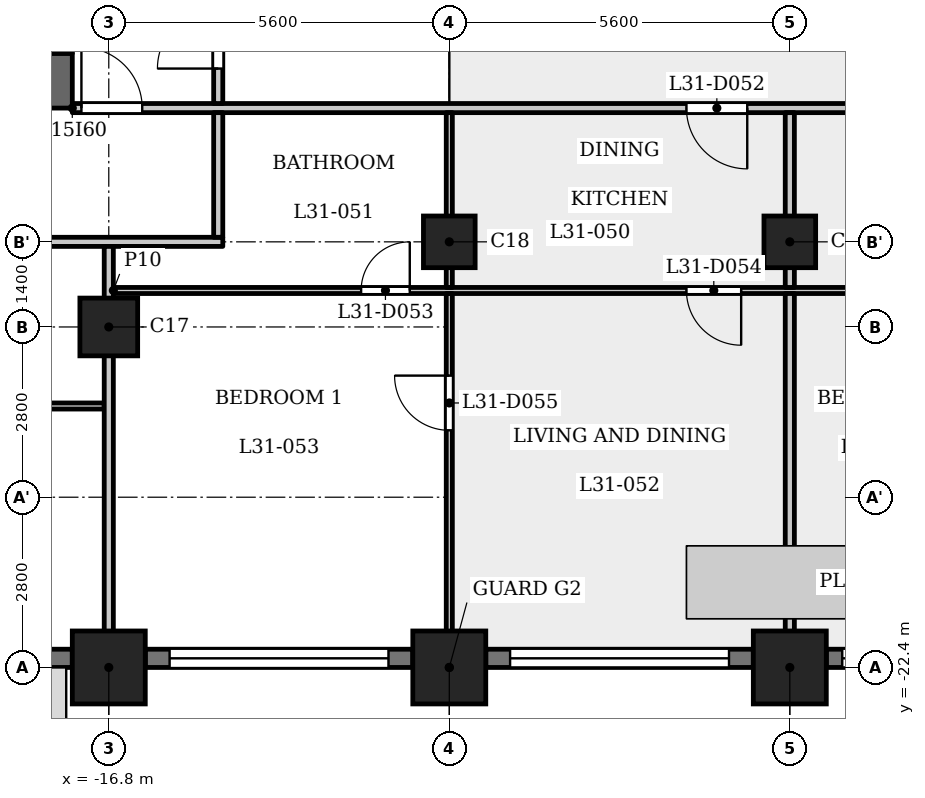
"""IFC4 building model, lengths in metres.
Left out: names, types, materials, properties, quantities, classifications, styles, units other than length and angle.
Written with IfcOpenShell. Run it as: python <this file> out.ifc"""

import sys

from ifc_helpers import new_model, si_unit, direction, frame, frame_2d, origin, origin_2d, place, context, subcontext, project, spatial, rectangle, extrude, element, fill, save


model = new_model("IFC4")
c1 = context("Model", 3, precision=1e-05, world=origin(), true_north=direction((0.0, 1.0)))
c2 = subcontext(c1, "Body", "Model", "MODEL_VIEW")
j1 = project(units=[si_unit("LENGTHUNIT", "METRE"), si_unit("PLANEANGLEUNIT", "RADIAN")], contexts=[c1])
p1 = place(None, origin())
s1 = spatial("IfcSite", under=j1, at=p1, CompositionType="ELEMENT")
p2 = place(p1, origin())
s2 = spatial("IfcBuilding", under=s1, at=p2, CompositionType="ELEMENT")
p3 = place(p2, frame((0.0, 0.0, 121.8)))
s3 = spatial("IfcBuildingStorey", under=s2, at=p3, CompositionType="ELEMENT", Elevation=121.8)
for number, where, z_axis, x_axis in (
    (1, (-16.8, -22.4, 0.0), (0.0, 0.0, 1.0), (1.0, 0.0, 0.0)),
    (2, (-11.2, -22.4, 0.0), (0.0, 0.0, 1.0), (1.0, 0.0, 0.0)),
    (3, (-5.6, -22.4, 0.0), (0.0, 0.0, 1.0), (1.0, 0.0, 0.0)),
):
    element("IfcColumn", number, at=place(p3, frame(where, z_axis=z_axis, x_axis=x_axis)), inside=s3, PredefinedType="COLUMN", context=c2, shape_type="SweptSolid", body=[
        extrude(rectangle(XDim=1.2, YDim=1.2, at=origin_2d()), origin(), (0.0, 0.0, 1.0), 3.5),
    ])
p4 = place(p3, frame((-16.8, -16.8, 0.0), z_axis=(0.0, 0.0, 1.0), x_axis=(1.0, 0.0, 0.0)))
e4 = element("IfcColumn", 4, at=p4, inside=s3, PredefinedType="COLUMN", context=c2, shape_type="SweptSolid", body=[
    extrude(rectangle(XDim=0.95, YDim=0.95, at=origin_2d()), origin(), (0.0, 0.0, 1.0), 3.5),
])
for number, where, z_axis, x_axis in (
    (5, (-11.2, -15.4, 0.0), (0.0, 0.0, 1.0), (1.0, 0.0, 0.0)),
    (6, (-5.6, -15.4, 0.0), (0.0, 0.0, 1.0), (1.0, 0.0, 0.0)),
):
    element("IfcColumn", number, at=place(p3, frame(where, z_axis=z_axis, x_axis=x_axis)), inside=s3, PredefinedType="COLUMN", context=c2, shape_type="SweptSolid", body=[
        extrude(rectangle(XDim=0.85, YDim=0.85, at=origin_2d()), origin(), (0.0, 0.0, 1.0), 3.5),
    ])
p5 = place(p3, frame((-20.0, -22.25, 0.0), z_axis=(0.0, 0.0, 1.0), x_axis=(1.0, 0.0, 0.0)))
e7 = element("IfcWall", 7, at=p5, inside=s3, PredefinedType="SOLIDWALL", context=c2, shape_type="SweptSolid", body=[
    extrude(rectangle(XDim=2.6, YDim=0.3, at=frame_2d((1.3, 0.0))), origin(), (0.0, 0.0, 1.0), 2.35),
])
p6 = place(p5, frame((0.4, 0.0, 0.9)))
e8 = element("IfcOpeningElement", 8, at=p6, cuts=e7, PredefinedType="OPENING", context=c2, shape_type="SweptSolid", body=[
    extrude(rectangle(XDim=1.8, YDim=1.25, at=frame_2d((0.9, 0.625))), frame((0.0, 0.16, 0.0), z_axis=(0.0, -1.0, 0.0), x_axis=(1.0, 0.0, 0.0)), (0.0, 0.0, 1.0), 0.32),
])
p7 = place(p3, frame((-16.2, -22.25, 0.0), z_axis=(0.0, 0.0, 1.0), x_axis=(1.0, 0.0, 0.0)))
e9 = element("IfcWall", 9, at=p7, inside=s3, PredefinedType="SOLIDWALL", context=c2, shape_type="SweptSolid", body=[
    extrude(rectangle(XDim=4.4, YDim=0.3, at=frame_2d((2.2, 0.0))), origin(), (0.0, 0.0, 1.0), 2.35),
])
p8 = place(p7, frame((0.4, 0.0, 1.2)))
e10 = element("IfcOpeningElement", 10, at=p8, cuts=e9, PredefinedType="OPENING", context=c2, shape_type="SweptSolid", body=[
    extrude(rectangle(XDim=3.6, YDim=0.95, at=frame_2d((1.8, 0.475))), frame((0.0, 0.16, 0.0), z_axis=(0.0, -1.0, 0.0), x_axis=(1.0, 0.0, 0.0)), (0.0, 0.0, 1.0), 0.32),
])
p9 = place(p3, frame((-10.6, -22.25, 0.0), z_axis=(0.0, 0.0, 1.0), x_axis=(1.0, 0.0, 0.0)))
e11 = element("IfcWall", 11, at=p9, inside=s3, PredefinedType="SOLIDWALL", context=c2, shape_type="SweptSolid", body=[
    extrude(rectangle(XDim=4.4, YDim=0.3, at=frame_2d((2.2, 0.0))), origin(), (0.0, 0.0, 1.0), 2.35),
])
p10 = place(p9, frame((0.4, 0.0, 1.2)))
e12 = element("IfcOpeningElement", 12, at=p10, cuts=e11, PredefinedType="OPENING", context=c2, shape_type="SweptSolid", body=[
    extrude(rectangle(XDim=3.6, YDim=0.95, at=frame_2d((1.8, 0.475))), frame((0.0, 0.16, 0.0), z_axis=(0.0, -1.0, 0.0), x_axis=(1.0, 0.0, 0.0)), (0.0, 0.0, 1.0), 0.32),
])
p11 = place(p3, frame((-5.0, -22.25, 0.0), z_axis=(0.0, 0.0, 1.0), x_axis=(1.0, 0.0, 0.0)))
e13 = element("IfcWall", 13, at=p11, inside=s3, PredefinedType="SOLIDWALL", context=c2, shape_type="SweptSolid", body=[
    extrude(rectangle(XDim=4.4, YDim=0.3, at=frame_2d((2.2, 0.0))), origin(), (0.0, 0.0, 1.0), 2.35),
])
p12 = place(p11, frame((0.262, 0.0, 0.9)))
e14 = element("IfcOpeningElement", 14, at=p12, cuts=e13, PredefinedType="OPENING", context=c2, shape_type="SweptSolid", body=[
    extrude(rectangle(XDim=1.8, YDim=1.25, at=frame_2d((0.9, 0.625))), frame((0.0, 0.16, 0.0), z_axis=(0.0, -1.0, 0.0), x_axis=(1.0, 0.0, 0.0)), (0.0, 0.0, 1.0), 0.32),
])
p13 = place(p11, frame((2.837, 0.0, 0.6)))
e15 = element("IfcOpeningElement", 15, at=p13, cuts=e13, PredefinedType="OPENING", context=c2, shape_type="SweptSolid", body=[
    extrude(rectangle(XDim=1.2, YDim=1.55, at=frame_2d((0.6, 0.775))), frame((0.0, 0.16, 0.0), z_axis=(0.0, -1.0, 0.0), x_axis=(1.0, 0.0, 0.0)), (0.0, 0.0, 1.0), 0.32),
])
p14 = place(p3, frame((-17.4, -12.75, 0.0), z_axis=(0.0, 0.0, 1.0), x_axis=(-1.0, 0.0, 0.0)))
e16 = element("IfcWall", 16, at=p14, inside=s3, PredefinedType="SHEAR", context=c2, shape_type="SweptSolid", body=[
    extrude(rectangle(XDim=10.4, YDim=0.9, at=frame_2d((5.2, 0.0))), origin(), (0.0, 0.0, 1.0), 3.15),
])
p15 = place(p3, frame((-17.6, -12.3, 0.0), z_axis=(0.0, 0.0, 1.0), x_axis=(0.0, 1.0, 0.0)))
e17 = element("IfcWall", 17, at=p15, inside=s3, PredefinedType="SHEAR", context=c2, shape_type="SweptSolid", body=[
    extrude(rectangle(XDim=24.6, YDim=0.4, at=frame_2d((12.3, 0.0))), origin(), (0.0, 0.0, 1.0), 3.15),
])
p16 = place(p15, frame((6.0, 0.0, 0.0)))
e18 = element("IfcOpeningElement", 18, at=p16, cuts=e17, PredefinedType="OPENING", context=c2, shape_type="SweptSolid", body=[
    extrude(rectangle(XDim=1.1, YDim=2.1, at=frame_2d((0.55, 1.05))), frame((0.0, 0.21, 0.0), z_axis=(0.0, -1.0, 0.0), x_axis=(1.0, 0.0, 0.0)), (0.0, 0.0, 1.0), 0.42),
])
p17 = place(p15, frame((8.4, 0.0, 0.0)))
e19 = element("IfcOpeningElement", 19, at=p17, cuts=e17, PredefinedType="OPENING", context=c2, shape_type="SweptSolid", body=[
    extrude(rectangle(XDim=1.1, YDim=2.1, at=frame_2d((0.55, 1.05))), frame((0.0, 0.21, 0.0), z_axis=(0.0, -1.0, 0.0), x_axis=(1.0, 0.0, 0.0)), (0.0, 0.0, 1.0), 0.42),
])
p18 = place(p15, frame((10.8, 0.0, 0.0)))
e20 = element("IfcOpeningElement", 20, at=p18, cuts=e17, PredefinedType="OPENING", context=c2, shape_type="SweptSolid", body=[
    extrude(rectangle(XDim=1.1, YDim=2.1, at=frame_2d((0.55, 1.05))), frame((0.0, 0.21, 0.0), z_axis=(0.0, -1.0, 0.0), x_axis=(1.0, 0.0, 0.0)), (0.0, 0.0, 1.0), 0.42),
])
p19 = place(p15, frame((22.8, 0.0, 0.0)))
e21 = element("IfcOpeningElement", 21, at=p19, cuts=e17, PredefinedType="OPENING", context=c2, shape_type="SweptSolid", body=[
    extrude(rectangle(XDim=1.1, YDim=2.1, at=frame_2d((0.55, 1.05))), frame((0.0, 0.21, 0.0), z_axis=(0.0, -1.0, 0.0), x_axis=(1.0, 0.0, 0.0)), (0.0, 0.0, 1.0), 0.42),
])
p20 = place(p15, frame((0.7, 0.0, 0.0)))
e22 = element("IfcOpeningElement", 22, at=p20, cuts=e17, PredefinedType="OPENING", context=c2, shape_type="SweptSolid", body=[
    extrude(rectangle(XDim=1.1, YDim=2.1, at=frame_2d((0.55, 1.05))), frame((0.0, 0.21, 0.0), z_axis=(0.0, -1.0, 0.0), x_axis=(1.0, 0.0, 0.0)), (0.0, 0.0, 1.0), 0.42),
])
p21 = place(p15, frame((12.775, 0.0, 0.0)))
e23 = element("IfcOpeningElement", 23, at=p21, cuts=e17, PredefinedType="OPENING", context=c2, shape_type="SweptSolid", body=[
    extrude(rectangle(XDim=1.8, YDim=2.1, at=frame_2d((0.9, 1.05))), frame((0.0, 0.21, 0.0), z_axis=(0.0, -1.0, 0.0), x_axis=(1.0, 0.0, 0.0)), (0.0, 0.0, 1.0), 0.42),
])
p22 = place(p3, frame((-26.19, -18.1, 0.0), z_axis=(0.0, 0.0, 1.0), x_axis=(1.0, 0.0, 0.0)))
e24 = element("IfcWall", 24, at=p22, inside=s3, PredefinedType="PARTITIONING", context=c2, shape_type="SweptSolid", body=[
    extrude(rectangle(XDim=9.315, YDim=0.1, at=frame_2d((4.658, 0.0))), origin(), (0.0, 0.0, 1.0), 3.15),
])
p23 = place(p22, frame((1.09, 0.0, 0.0)))
e25 = element("IfcOpeningElement", 25, at=p23, cuts=e24, PredefinedType="OPENING", context=c2, shape_type="SweptSolid", body=[
    extrude(rectangle(XDim=0.8, YDim=2.1, at=frame_2d((0.4, 1.05))), frame((0.0, 0.06, 0.0), z_axis=(0.0, -1.0, 0.0), x_axis=(1.0, 0.0, 0.0)), (0.0, 0.0, 1.0), 0.12),
])
p24 = place(p22, frame((4.44, 0.0, 0.0)))
e26 = element("IfcOpeningElement", 26, at=p24, cuts=e24, PredefinedType="OPENING", context=c2, shape_type="SweptSolid", body=[
    extrude(rectangle(XDim=0.9, YDim=2.1, at=frame_2d((0.45, 1.05))), frame((0.0, 0.06, 0.0), z_axis=(0.0, -1.0, 0.0), x_axis=(1.0, 0.0, 0.0)), (0.0, 0.0, 1.0), 0.12),
])
p25 = place(p3, frame((-16.725, -16.2, 0.0), z_axis=(0.0, 0.0, 1.0), x_axis=(1.0, 0.0, 0.0)))
e27 = element("IfcWall", 27, at=p25, inside=s3, PredefinedType="PARTITIONING", context=c2, shape_type="SweptSolid", body=[
    extrude(rectangle(XDim=33.45, YDim=0.1, at=frame_2d((16.725, 0.0))), origin(), (0.0, 0.0, 1.0), 3.15),
])
p26 = place(p25, frame((4.075, 0.0, 0.0)))
e28 = element("IfcOpeningElement", 28, at=p26, cuts=e27, PredefinedType="OPENING", context=c2, shape_type="SweptSolid", body=[
    extrude(rectangle(XDim=0.8, YDim=2.1, at=frame_2d((0.4, 1.05))), frame((0.0, 0.06, 0.0), z_axis=(0.0, -1.0, 0.0), x_axis=(1.0, 0.0, 0.0)), (0.0, 0.0, 1.0), 0.12),
])
p27 = place(p25, frame((9.425, 0.0, 0.0)))
e29 = element("IfcOpeningElement", 29, at=p27, cuts=e27, PredefinedType="OPENING", context=c2, shape_type="SweptSolid", body=[
    extrude(rectangle(XDim=0.9, YDim=2.1, at=frame_2d((0.45, 1.05))), frame((0.0, 0.06, 0.0), z_axis=(0.0, -1.0, 0.0), x_axis=(1.0, 0.0, 0.0)), (0.0, 0.0, 1.0), 0.12),
])
p28 = place(p25, frame((19.875, 0.0, 0.0)))
e30 = element("IfcOpeningElement", 30, at=p28, cuts=e27, PredefinedType="OPENING", context=c2, shape_type="SweptSolid", body=[
    extrude(rectangle(XDim=0.8, YDim=2.1, at=frame_2d((0.4, 1.05))), frame((0.0, 0.06, 0.0), z_axis=(0.0, -1.0, 0.0), x_axis=(1.0, 0.0, 0.0)), (0.0, 0.0, 1.0), 0.12),
])
p29 = place(p25, frame((17.375, 0.0, 0.0)))
e31 = element("IfcOpeningElement", 31, at=p29, cuts=e27, PredefinedType="OPENING", context=c2, shape_type="SweptSolid", body=[
    extrude(rectangle(XDim=0.9, YDim=2.1, at=frame_2d((0.45, 1.05))), frame((0.0, 0.06, 0.0), z_axis=(0.0, -1.0, 0.0), x_axis=(1.0, 0.0, 0.0)), (0.0, 0.0, 1.0), 0.12),
])
p30 = place(p25, frame((12.525, 0.0, 0.0)))
e32 = element("IfcOpeningElement", 32, at=p30, cuts=e27, PredefinedType="OPENING", context=c2, shape_type="SweptSolid", body=[
    extrude(rectangle(XDim=0.9, YDim=2.1, at=frame_2d((0.45, 1.05))), frame((0.0, 0.06, 0.0), z_axis=(0.0, -1.0, 0.0), x_axis=(1.0, 0.0, 0.0)), (0.0, 0.0, 1.0), 0.12),
])
p31 = place(p25, frame((14.775, 0.0, 0.0)))
e33 = element("IfcOpeningElement", 33, at=p31, cuts=e27, PredefinedType="OPENING", context=c2, shape_type="SweptSolid", body=[
    extrude(rectangle(XDim=0.9, YDim=2.1, at=frame_2d((0.45, 1.05))), frame((0.0, 0.06, 0.0), z_axis=(0.0, -1.0, 0.0), x_axis=(1.0, 0.0, 0.0)), (0.0, 0.0, 1.0), 0.12),
])
p32 = place(p25, frame((26.475, 0.0, 0.0)))
e34 = element("IfcOpeningElement", 34, at=p32, cuts=e27, PredefinedType="OPENING", context=c2, shape_type="SweptSolid", body=[
    extrude(rectangle(XDim=0.8, YDim=2.1, at=frame_2d((0.4, 1.05))), frame((0.0, 0.06, 0.0), z_axis=(0.0, -1.0, 0.0), x_axis=(1.0, 0.0, 0.0)), (0.0, 0.0, 1.0), 0.12),
])
p33 = place(p25, frame((23.725, 0.0, 0.0)))
e35 = element("IfcOpeningElement", 35, at=p33, cuts=e27, PredefinedType="OPENING", context=c2, shape_type="SweptSolid", body=[
    extrude(rectangle(XDim=0.9, YDim=2.1, at=frame_2d((0.45, 1.05))), frame((0.0, 0.06, 0.0), z_axis=(0.0, -1.0, 0.0), x_axis=(1.0, 0.0, 0.0)), (0.0, 0.0, 1.0), 0.12),
])
p34 = place(p25, frame((29.075, 0.0, 0.0)))
e36 = element("IfcOpeningElement", 36, at=p34, cuts=e27, PredefinedType="OPENING", context=c2, shape_type="SweptSolid", body=[
    extrude(rectangle(XDim=0.8, YDim=2.1, at=frame_2d((0.4, 1.05))), frame((0.0, 0.06, 0.0), z_axis=(0.0, -1.0, 0.0), x_axis=(1.0, 0.0, 0.0)), (0.0, 0.0, 1.0), 0.12),
])
p35 = place(p25, frame((30.675, 0.0, 0.0)))
e37 = element("IfcOpeningElement", 37, at=p35, cuts=e27, PredefinedType="OPENING", context=c2, shape_type="SweptSolid", body=[
    extrude(rectangle(XDim=0.9, YDim=2.1, at=frame_2d((0.45, 1.05))), frame((0.0, 0.06, 0.0), z_axis=(0.0, -1.0, 0.0), x_axis=(1.0, 0.0, 0.0)), (0.0, 0.0, 1.0), 0.12),
])
p36 = place(p3, frame((-27.484, -15.4, 0.0), z_axis=(0.0, 0.0, 1.0), x_axis=(1.0, 0.0, 0.0)))
e38 = element("IfcWall", 38, at=p36, inside=s3, PredefinedType="PARTITIONING", context=c2, shape_type="SweptSolid", body=[
    extrude(rectangle(XDim=12.559, YDim=0.15, at=frame_2d((6.279, 0.0))), origin(), (0.0, 0.0, 1.0), 3.15),
])
p37 = place(p36, frame((5.734, 0.0, 0.0)))
e39 = element("IfcOpeningElement", 39, at=p37, cuts=e38, PredefinedType="OPENING", context=c2, shape_type="SweptSolid", body=[
    extrude(rectangle(XDim=1.0, YDim=2.1, at=frame_2d((0.5, 1.05))), frame((0.0, 0.085, 0.0), z_axis=(0.0, -1.0, 0.0), x_axis=(1.0, 0.0, 0.0)), (0.0, 0.0, 1.0), 0.17),
])
p38 = place(p3, frame((-17.4, -13.2, 0.0), z_axis=(0.0, 0.0, 1.0), x_axis=(1.0, 0.0, 0.0)))
e40 = element("IfcWall", 40, at=p38, inside=s3, PredefinedType="PARTITIONING", context=c2, shape_type="SweptSolid", body=[
    extrude(rectangle(XDim=34.8, YDim=0.15, at=frame_2d((17.4, 0.0))), origin(), (0.0, 0.0, 1.0), 3.15),
])
p39 = place(p38, frame((0.15, 0.0, 0.0)))
e41 = element("IfcOpeningElement", 41, at=p39, cuts=e40, PredefinedType="OPENING", context=c2, shape_type="SweptSolid", body=[
    extrude(rectangle(XDim=1.0, YDim=2.1, at=frame_2d((0.5, 1.05))), frame((0.0, 0.085, 0.0), z_axis=(0.0, -1.0, 0.0), x_axis=(1.0, 0.0, 0.0)), (0.0, 0.0, 1.0), 0.17),
])
p40 = place(p38, frame((33.55, 0.0, 0.0)))
e42 = element("IfcOpeningElement", 42, at=p40, cuts=e40, PredefinedType="OPENING", context=c2, shape_type="SweptSolid", body=[
    extrude(rectangle(XDim=1.0, YDim=2.1, at=frame_2d((0.5, 1.05))), frame((0.0, 0.085, 0.0), z_axis=(0.0, -1.0, 0.0), x_axis=(1.0, 0.0, 0.0)), (0.0, 0.0, 1.0), 0.17),
])
p41 = place(p38, frame((10.1, 0.0, 0.0)))
e43 = element("IfcOpeningElement", 43, at=p41, cuts=e40, PredefinedType="OPENING", context=c2, shape_type="SweptSolid", body=[
    extrude(rectangle(XDim=1.0, YDim=2.1, at=frame_2d((0.5, 1.05))), frame((0.0, 0.085, 0.0), z_axis=(0.0, -1.0, 0.0), x_axis=(1.0, 0.0, 0.0)), (0.0, 0.0, 1.0), 0.17),
])
p42 = place(p38, frame((15.7, 0.0, 0.0)))
e44 = element("IfcOpeningElement", 44, at=p42, cuts=e40, PredefinedType="OPENING", context=c2, shape_type="SweptSolid", body=[
    extrude(rectangle(XDim=1.0, YDim=2.1, at=frame_2d((0.5, 1.05))), frame((0.0, 0.085, 0.0), z_axis=(0.0, -1.0, 0.0), x_axis=(1.0, 0.0, 0.0)), (0.0, 0.0, 1.0), 0.17),
])
p43 = place(p38, frame((24.9, 0.0, 0.0)))
e45 = element("IfcOpeningElement", 45, at=p43, cuts=e40, PredefinedType="OPENING", context=c2, shape_type="SweptSolid", body=[
    extrude(rectangle(XDim=1.0, YDim=2.1, at=frame_2d((0.5, 1.05))), frame((0.0, 0.085, 0.0), z_axis=(0.0, -1.0, 0.0), x_axis=(1.0, 0.0, 0.0)), (0.0, 0.0, 1.0), 0.17),
])
p44 = place(p3, frame((-16.8, -22.98, 0.0), z_axis=(0.0, 0.0, 1.0), x_axis=(0.0, 1.0, 0.0)))
e46 = element("IfcWall", 46, at=p44, inside=s3, PredefinedType="PARTITIONING", context=c2, shape_type="SweptSolid", body=[
    extrude(rectangle(XDim=7.505, YDim=0.15, at=frame_2d((3.752, 0.0))), origin(), (0.0, 0.0, 1.0), 3.15),
])
p45 = place(p3, frame((-15.0, -15.325, 0.0), z_axis=(0.0, 0.0, 1.0), x_axis=(0.0, 1.0, 0.0)))
e47 = element("IfcWall", 47, at=p45, inside=s3, PredefinedType="PARTITIONING", context=c2, shape_type="SweptSolid", body=[
    extrude(rectangle(XDim=2.05, YDim=0.15, at=frame_2d((1.025, 0.0))), origin(), (0.0, 0.0, 1.0), 3.15),
])
p46 = place(p3, frame((-15.0, -13.125, 0.0), z_axis=(0.0, 0.0, 1.0), x_axis=(0.0, 1.0, 0.0)))
e48 = element("IfcWall", 48, at=p46, inside=s3, PredefinedType="PARTITIONING", context=c2, shape_type="SweptSolid", body=[
    extrude(rectangle(XDim=6.356, YDim=0.15, at=frame_2d((3.178, 0.0))), origin(), (0.0, 0.0, 1.0), 3.15),
])
p47 = place(p46, frame((0.575, 0.0, 0.0)))
e49 = element("IfcOpeningElement", 49, at=p47, cuts=e48, PredefinedType="OPENING", context=c2, shape_type="SweptSolid", body=[
    extrude(rectangle(XDim=1.0, YDim=2.1, at=frame_2d((0.5, 1.05))), frame((0.0, 0.085, 0.0), z_axis=(0.0, -1.0, 0.0), x_axis=(1.0, 0.0, 0.0)), (0.0, 0.0, 1.0), 0.17),
])
p48 = place(p3, frame((-11.2, -22.98, 0.0), z_axis=(0.0, 0.0, 1.0), x_axis=(0.0, 1.0, 0.0)))
e50 = element("IfcWall", 50, at=p48, inside=s3, PredefinedType="PARTITIONING", context=c2, shape_type="SweptSolid", body=[
    extrude(rectangle(XDim=6.73, YDim=0.1, at=frame_2d((3.365, 0.0))), origin(), (0.0, 0.0, 1.0), 3.15),
])
p49 = place(p48, frame((4.48, 0.0, 0.0)))
e51 = element("IfcOpeningElement", 51, at=p49, cuts=e50, PredefinedType="OPENING", context=c2, shape_type="SweptSolid", body=[
    extrude(rectangle(XDim=0.9, YDim=2.1, at=frame_2d((0.45, 1.05))), frame((0.0, 0.06, 0.0), z_axis=(0.0, -1.0, 0.0), x_axis=(1.0, 0.0, 0.0)), (0.0, 0.0, 1.0), 0.12),
])
p50 = place(p3, frame((-11.2, -16.15, 0.0), z_axis=(0.0, 0.0, 1.0), x_axis=(0.0, 1.0, 0.0)))
e52 = element("IfcWall", 52, at=p50, inside=s3, PredefinedType="PARTITIONING", context=c2, shape_type="SweptSolid", body=[
    extrude(rectangle(XDim=2.875, YDim=0.1, at=frame_2d((1.438, 0.0))), origin(), (0.0, 0.0, 1.0), 3.15),
])
p51 = place(p3, frame((-5.6, -22.98, 0.0), z_axis=(0.0, 0.0, 1.0), x_axis=(0.0, 1.0, 0.0)))
e53 = element("IfcWall", 53, at=p51, inside=s3, PredefinedType="PARTITIONING", context=c2, shape_type="SweptSolid", body=[
    extrude(rectangle(XDim=6.73, YDim=0.15, at=frame_2d((3.365, 0.0))), origin(), (0.0, 0.0, 1.0), 3.15),
])
p52 = place(p3, frame((-5.6, -16.15, 0.0), z_axis=(0.0, 0.0, 1.0), x_axis=(0.0, 1.0, 0.0)))
e54 = element("IfcWall", 54, at=p52, inside=s3, PredefinedType="PARTITIONING", context=c2, shape_type="SweptSolid", body=[
    extrude(rectangle(XDim=2.875, YDim=0.15, at=frame_2d((1.438, 0.0))), origin(), (0.0, 0.0, 1.0), 3.15),
])
p53 = place(p47, origin())
e55 = element("IfcDoor", 55, at=p53, inside=s3, OperationType="SINGLE_SWING_RIGHT", PredefinedType="DOOR", context=c2, shape_type="SweptSolid", body=[
    extrude(rectangle(XDim=1.0, YDim=2.1, at=frame_2d((0.5, 1.05))), frame((0.0, 0.025, 0.0), z_axis=(0.0, -1.0, 0.0), x_axis=(1.0, 0.0, 0.0)), (0.0, 0.0, 1.0), 0.05),
])
fill(e49, e55)
p54 = place(p39, origin())
e56 = element("IfcDoor", 56, at=p54, inside=s3, OperationType="SINGLE_SWING_RIGHT", PredefinedType="DOOR", context=c2, shape_type="SweptSolid", body=[
    extrude(rectangle(XDim=1.0, YDim=2.1, at=frame_2d((0.5, 1.05))), frame((0.0, 0.025, 0.0), z_axis=(0.0, -1.0, 0.0), x_axis=(1.0, 0.0, 0.0)), (0.0, 0.0, 1.0), 0.05),
])
fill(e41, e56)
p55 = place(p41, origin())
e57 = element("IfcDoor", 57, at=p55, inside=s3, OperationType="SINGLE_SWING_RIGHT", PredefinedType="DOOR", context=c2, shape_type="SweptSolid", body=[
    extrude(rectangle(XDim=1.0, YDim=2.1, at=frame_2d((0.5, 1.05))), frame((0.0, 0.025, 0.0), z_axis=(0.0, -1.0, 0.0), x_axis=(1.0, 0.0, 0.0)), (0.0, 0.0, 1.0), 0.05),
])
fill(e43, e57)
p56 = place(p26, origin())
e58 = element("IfcDoor", 58, at=p56, inside=s3, OperationType="SINGLE_SWING_LEFT", PredefinedType="DOOR", context=c2, shape_type="SweptSolid", body=[
    extrude(rectangle(XDim=0.8, YDim=2.1, at=frame_2d((0.4, 1.05))), frame((0.0, 0.025, 0.0), z_axis=(0.0, -1.0, 0.0), x_axis=(1.0, 0.0, 0.0)), (0.0, 0.0, 1.0), 0.05),
])
fill(e28, e58)
p57 = place(p27, origin())
e59 = element("IfcDoor", 59, at=p57, inside=s3, OperationType="SINGLE_SWING_RIGHT", PredefinedType="DOOR", context=c2, shape_type="SweptSolid", body=[
    extrude(rectangle(XDim=0.9, YDim=2.1, at=frame_2d((0.45, 1.05))), frame((0.0, 0.025, 0.0), z_axis=(0.0, -1.0, 0.0), x_axis=(1.0, 0.0, 0.0)), (0.0, 0.0, 1.0), 0.05),
])
fill(e29, e59)
p58 = place(p49, origin())
e60 = element("IfcDoor", 60, at=p58, inside=s3, OperationType="SINGLE_SWING_LEFT", PredefinedType="DOOR", context=c2, shape_type="SweptSolid", body=[
    extrude(rectangle(XDim=0.9, YDim=2.1, at=frame_2d((0.45, 1.05))), frame((0.0, 0.025, 0.0), z_axis=(0.0, -1.0, 0.0), x_axis=(1.0, 0.0, 0.0)), (0.0, 0.0, 1.0), 0.05),
])
fill(e51, e60)
p59 = place(p8, origin())
e61 = element("IfcWindow", 61, at=p59, inside=s3, PartitioningType="SINGLE_PANEL", PredefinedType="WINDOW", context=c2, shape_type="SweptSolid", body=[
    extrude(rectangle(XDim=3.6, YDim=0.95, at=frame_2d((1.8, 0.475))), frame((0.0, 0.03, 0.0), z_axis=(0.0, -1.0, 0.0), x_axis=(1.0, 0.0, 0.0)), (0.0, 0.0, 1.0), 0.06),
])
fill(e10, e61)
p60 = place(p10, origin())
e62 = element("IfcWindow", 62, at=p60, inside=s3, PartitioningType="SINGLE_PANEL", PredefinedType="WINDOW", context=c2, shape_type="SweptSolid", body=[
    extrude(rectangle(XDim=3.6, YDim=0.95, at=frame_2d((1.8, 0.475))), frame((0.0, 0.03, 0.0), z_axis=(0.0, -1.0, 0.0), x_axis=(1.0, 0.0, 0.0)), (0.0, 0.0, 1.0), 0.06),
])
fill(e12, e62)
p61 = place(p12, origin())
e63 = element("IfcWindow", 63, at=p61, inside=s3, PartitioningType="SINGLE_PANEL", PredefinedType="WINDOW", context=c2, shape_type="SweptSolid", body=[
    extrude(rectangle(XDim=1.8, YDim=1.25, at=frame_2d((0.9, 0.625))), frame((0.0, 0.03, 0.0), z_axis=(0.0, -1.0, 0.0), x_axis=(1.0, 0.0, 0.0)), (0.0, 0.0, 1.0), 0.06),
])
fill(e14, e63)
save(model, sys.argv[1])
